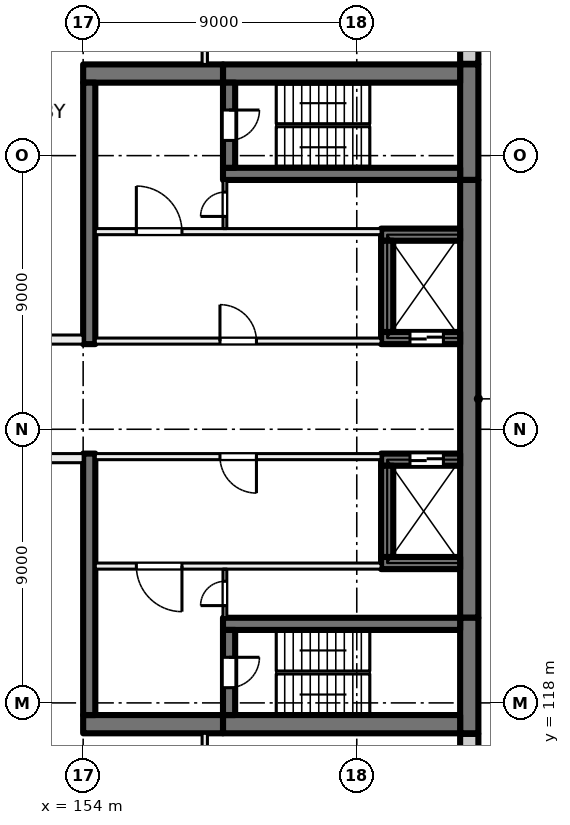
"""IFC4 building model, lengths in metres.
Left out: names, types, materials, properties, quantities, classifications, styles, units other than length and angle.
Written with IfcOpenShell. Run it as: python <this file> out.ifc"""

import sys

from ifc_helpers import new_model, si_unit, direction, frame, frame_2d, origin, place, context, subcontext, project, spatial, rectangle, extrude, element, fill, save


model = new_model("IFC4")
c1 = context("Model", 3, precision=1e-05, world=origin(), true_north=direction((0.0, 1.0)))
c2 = subcontext(c1, "Body", "Model", "MODEL_VIEW")
j1 = project(units=[si_unit("LENGTHUNIT", "METRE"), si_unit("PLANEANGLEUNIT", "RADIAN")], contexts=[c1])
p1 = place(None, origin())
s1 = spatial("IfcSite", under=j1, at=p1, CompositionType="ELEMENT")
p2 = place(p1, origin())
s2 = spatial("IfcBuilding", under=s1, at=p2, CompositionType="ELEMENT")
p3 = place(p2, frame((0.0, 0.0, 31.5)))
s3 = spatial("IfcBuildingStorey", under=s2, at=p3, CompositionType="ELEMENT", Elevation=31.5)
p4 = place(p3, frame((166.7, 139.0, 0.0), z_axis=(0.0, 0.0, 1.0), x_axis=(0.0, -1.0, 0.0)))
e1 = element("IfcWall", 1, at=p4, inside=s3, PredefinedType="SHEAR", context=c2, shape_type="SweptSolid", body=[
    extrude(rectangle(XDim=3.8, YDim=0.6, at=frame_2d((1.9, 0.0))), origin(), (0.0, 0.0, 1.0), 4.0),
])
p5 = place(p3, frame((166.7, 135.2, 0.0), z_axis=(0.0, 0.0, 1.0), x_axis=(0.0, -1.0, 0.0)))
e2 = element("IfcWall", 2, at=p5, inside=s3, PredefinedType="SHEAR", context=c2, shape_type="SweptSolid", body=[
    extrude(rectangle(XDim=14.4, YDim=0.6, at=frame_2d((7.2, 0.0))), origin(), (0.0, 0.0, 1.0), 4.0),
])
p6 = place(p3, frame((166.7, 120.8, 0.0), z_axis=(0.0, 0.0, 1.0), x_axis=(0.0, -1.0, 0.0)))
e3 = element("IfcWall", 3, at=p6, inside=s3, PredefinedType="SHEAR", context=c2, shape_type="SweptSolid", body=[
    extrude(rectangle(XDim=3.8, YDim=0.6, at=frame_2d((1.9, 0.0))), origin(), (0.0, 0.0, 1.0), 4.0),
])
for number, where, z_axis, x_axis in (
    (4, (166.4, 138.7, 0.0), (0.0, 0.0, 1.0), (-1.0, 0.0, 0.0)),
    (5, (166.4, 117.3, 0.0), (0.0, 0.0, 1.0), (-1.0, 0.0, 0.0)),
):
    element("IfcWall", number, at=place(p3, frame(where, z_axis=z_axis, x_axis=x_axis)), inside=s3, PredefinedType="SHEAR", context=c2, shape_type="SweptSolid", body=[
        extrude(rectangle(XDim=7.8, YDim=0.6, at=frame_2d((3.9, 0.0))), origin(), (0.0, 0.0, 1.0), 4.0),
    ])
for number, where, z_axis, x_axis in (
    (6, (158.6, 138.7, 0.0), (0.0, 0.0, 1.0), (-1.0, 0.0, 0.0)),
    (7, (158.6, 117.3, 0.0), (0.0, 0.0, 1.0), (-1.0, 0.0, 0.0)),
):
    element("IfcWall", number, at=place(p3, frame(where, z_axis=z_axis, x_axis=x_axis)), inside=s3, PredefinedType="SHEAR", context=c2, shape_type="SweptSolid", body=[
        extrude(rectangle(XDim=4.6, YDim=0.6, at=frame_2d((2.3, 0.0))), origin(), (0.0, 0.0, 1.0), 4.0),
    ])
p7 = place(p3, frame((166.4, 135.4, 0.0), z_axis=(0.0, 0.0, 1.0), x_axis=(-1.0, 0.0, 0.0)))
e8 = element("IfcWall", 8, at=p7, inside=s3, PredefinedType="SHEAR", context=c2, shape_type="SweptSolid", body=[
    extrude(rectangle(XDim=7.8, YDim=0.4, at=frame_2d((3.9, 0.0))), origin(), (0.0, 0.0, 1.0), 4.0),
])
p8 = place(p3, frame((158.8, 138.4, 0.0), z_axis=(0.0, 0.0, 1.0), x_axis=(0.0, -1.0, 0.0)))
e9 = element("IfcWall", 9, at=p8, inside=s3, PredefinedType="SHEAR", context=c2, shape_type="SweptSolid", body=[
    extrude(rectangle(XDim=2.8, YDim=0.4, at=frame_2d((1.4, 0.0))), origin(), (0.0, 0.0, 1.0), 4.0),
])
p9 = place(p8, frame((0.9, 0.0, 0.0)))
e10 = element("IfcOpeningElement", 10, at=p9, cuts=e9, PredefinedType="OPENING", context=c2, shape_type="SweptSolid", body=[
    extrude(rectangle(XDim=1.0, YDim=2.1, at=frame_2d((0.5, 1.05))), frame((0.0, 0.21, 0.0), z_axis=(0.0, -1.0, 0.0), x_axis=(1.0, 0.0, 0.0)), (0.0, 0.0, 1.0), 0.42),
])
p10 = place(p3, frame((166.4, 120.6, 0.0), z_axis=(0.0, 0.0, 1.0), x_axis=(-1.0, 0.0, 0.0)))
e11 = element("IfcWall", 11, at=p10, inside=s3, PredefinedType="SHEAR", context=c2, shape_type="SweptSolid", body=[
    extrude(rectangle(XDim=7.8, YDim=0.4, at=frame_2d((3.9, 0.0))), origin(), (0.0, 0.0, 1.0), 4.0),
])
p11 = place(p3, frame((158.8, 120.4, 0.0), z_axis=(0.0, 0.0, 1.0), x_axis=(0.0, -1.0, 0.0)))
e12 = element("IfcWall", 12, at=p11, inside=s3, PredefinedType="SHEAR", context=c2, shape_type="SweptSolid", body=[
    extrude(rectangle(XDim=2.8, YDim=0.4, at=frame_2d((1.4, 0.0))), origin(), (0.0, 0.0, 1.0), 4.0),
])
p12 = place(p11, frame((0.9, 0.0, 0.0)))
e13 = element("IfcOpeningElement", 13, at=p12, cuts=e12, PredefinedType="OPENING", context=c2, shape_type="SweptSolid", body=[
    extrude(rectangle(XDim=1.0, YDim=2.1, at=frame_2d((0.5, 1.05))), frame((0.0, 0.21, 0.0), z_axis=(0.0, -1.0, 0.0), x_axis=(1.0, 0.0, 0.0)), (0.0, 0.0, 1.0), 0.42),
])
p13 = place(p3, frame((166.4, 130.0, 0.0), z_axis=(0.0, 0.0, 1.0), x_axis=(-1.0, 0.0, 0.0)))
e14 = element("IfcWall", 14, at=p13, inside=s3, PredefinedType="SHEAR", context=c2, shape_type="SweptSolid", body=[
    extrude(rectangle(XDim=2.6, YDim=0.4, at=frame_2d((1.3, 0.0))), origin(), (0.0, 0.0, 1.0), 4.0),
])
p14 = place(p13, frame((0.55, 0.0, 0.0)))
e15 = element("IfcOpeningElement", 15, at=p14, cuts=e14, PredefinedType="OPENING", context=c2, shape_type="SweptSolid", body=[
    extrude(rectangle(XDim=1.1, YDim=2.1, at=frame_2d((0.55, 1.05))), frame((0.0, 0.21, 0.0), z_axis=(0.0, -1.0, 0.0), x_axis=(1.0, 0.0, 0.0)), (0.0, 0.0, 1.0), 0.42),
])
p15 = place(p3, frame((166.4, 133.4, 0.0), z_axis=(0.0, 0.0, 1.0), x_axis=(-1.0, 0.0, 0.0)))
e16 = element("IfcWall", 16, at=p15, inside=s3, PredefinedType="SHEAR", context=c2, shape_type="SweptSolid", body=[
    extrude(rectangle(XDim=2.6, YDim=0.4, at=frame_2d((1.3, 0.0))), origin(), (0.0, 0.0, 1.0), 4.0),
])
p16 = place(p3, frame((164.0, 133.2, 0.0), z_axis=(0.0, 0.0, 1.0), x_axis=(0.0, -1.0, 0.0)))
e17 = element("IfcWall", 17, at=p16, inside=s3, PredefinedType="SHEAR", context=c2, shape_type="SweptSolid", body=[
    extrude(rectangle(XDim=3.0, YDim=0.4, at=frame_2d((1.5, 0.0))), origin(), (0.0, 0.0, 1.0), 4.0),
])
p17 = place(p3, frame((166.4, 126.0, 0.0), z_axis=(0.0, 0.0, 1.0), x_axis=(-1.0, 0.0, 0.0)))
e18 = element("IfcWall", 18, at=p17, inside=s3, PredefinedType="SHEAR", context=c2, shape_type="SweptSolid", body=[
    extrude(rectangle(XDim=2.6, YDim=0.4, at=frame_2d((1.3, 0.0))), origin(), (0.0, 0.0, 1.0), 4.0),
])
p18 = place(p17, frame((0.55, 0.0, 0.0)))
e19 = element("IfcOpeningElement", 19, at=p18, cuts=e18, PredefinedType="OPENING", context=c2, shape_type="SweptSolid", body=[
    extrude(rectangle(XDim=1.1, YDim=2.1, at=frame_2d((0.55, 1.05))), frame((0.0, 0.21, 0.0), z_axis=(0.0, -1.0, 0.0), x_axis=(1.0, 0.0, 0.0)), (0.0, 0.0, 1.0), 0.42),
])
p19 = place(p3, frame((166.4, 122.6, 0.0), z_axis=(0.0, 0.0, 1.0), x_axis=(-1.0, 0.0, 0.0)))
e20 = element("IfcWall", 20, at=p19, inside=s3, PredefinedType="SHEAR", context=c2, shape_type="SweptSolid", body=[
    extrude(rectangle(XDim=2.6, YDim=0.4, at=frame_2d((1.3, 0.0))), origin(), (0.0, 0.0, 1.0), 4.0),
])
p20 = place(p3, frame((164.0, 125.8, 0.0), z_axis=(0.0, 0.0, 1.0), x_axis=(0.0, -1.0, 0.0)))
e21 = element("IfcWall", 21, at=p20, inside=s3, PredefinedType="SHEAR", context=c2, shape_type="SweptSolid", body=[
    extrude(rectangle(XDim=3.0, YDim=0.4, at=frame_2d((1.5, 0.0))), origin(), (0.0, 0.0, 1.0), 4.0),
])
for number, where, z_axis, x_axis in (
    (22, (154.2, 138.4, 0.0), (0.0, 0.0, 1.0), (0.0, -1.0, 0.0)),
    (23, (154.2, 126.2, 0.0), (0.0, 0.0, 1.0), (0.0, -1.0, 0.0)),
):
    element("IfcWall", number, at=place(p3, frame(where, z_axis=z_axis, x_axis=x_axis)), inside=s3, PredefinedType="SHEAR", context=c2, shape_type="SweptSolid", body=[
        extrude(rectangle(XDim=8.6, YDim=0.4, at=frame_2d((4.3, 0.0))), origin(), (0.0, 0.0, 1.0), 4.0),
    ])
p21 = place(p3, frame((166.7, 116.98, 0.0), z_axis=(0.0, 0.0, 1.0), x_axis=(0.0, -1.0, 0.0)))
e24 = element("IfcWall", 24, at=p21, inside=s3, PredefinedType="SOLIDWALL", context=c2, shape_type="SweptSolid", body=[
    extrude(rectangle(XDim=2.98, YDim=0.6, at=frame_2d((1.49, 0.0))), origin(), (0.0, 0.0, 1.0), 3.625),
])
p22 = place(p3, frame((166.7, 141.93, 0.0), z_axis=(0.0, 0.0, 1.0), x_axis=(0.0, -1.0, 0.0)))
e25 = element("IfcWall", 25, at=p22, inside=s3, PredefinedType="SOLIDWALL", context=c2, shape_type="SweptSolid", body=[
    extrude(rectangle(XDim=2.91, YDim=0.6, at=frame_2d((1.455, 0.0))), origin(), (0.0, 0.0, 1.0), 3.625),
])
p23 = place(p3, frame((163.8, 126.1, 0.0), z_axis=(0.0, 0.0, 1.0), x_axis=(-1.0, 0.0, 0.0)))
e26 = element("IfcWall", 26, at=p23, inside=s3, PredefinedType="PARTITIONING", context=c2, shape_type="SweptSolid", body=[
    extrude(rectangle(XDim=9.4, YDim=0.2, at=frame_2d((4.7, 0.0))), origin(), (0.0, 0.0, 1.0), 3.625),
])
p24 = place(p23, frame((4.1, 0.0, 0.0)))
e27 = element("IfcOpeningElement", 27, at=p24, cuts=e26, PredefinedType="OPENING", context=c2, shape_type="SweptSolid", body=[
    extrude(rectangle(XDim=1.2, YDim=2.1, at=frame_2d((0.6, 1.05))), frame((0.0, 0.11, 0.0), z_axis=(0.0, -1.0, 0.0), x_axis=(1.0, 0.0, 0.0)), (0.0, 0.0, 1.0), 0.22),
])
p25 = place(p3, frame((163.8, 122.5, 0.0), z_axis=(0.0, 0.0, 1.0), x_axis=(-1.0, 0.0, 0.0)))
e28 = element("IfcWall", 28, at=p25, inside=s3, PredefinedType="PARTITIONING", context=c2, shape_type="SweptSolid", body=[
    extrude(rectangle(XDim=9.4, YDim=0.2, at=frame_2d((4.7, 0.0))), origin(), (0.0, 0.0, 1.0), 3.625),
])
p26 = place(p25, frame((6.55, 0.0, 0.0)))
e29 = element("IfcOpeningElement", 29, at=p26, cuts=e28, PredefinedType="OPENING", context=c2, shape_type="SweptSolid", body=[
    extrude(rectangle(XDim=1.5, YDim=2.1, at=frame_2d((0.75, 1.05))), frame((0.0, 0.11, 0.0), z_axis=(0.0, -1.0, 0.0), x_axis=(1.0, 0.0, 0.0)), (0.0, 0.0, 1.0), 0.22),
])
p27 = place(p3, frame((158.663, 120.8, 0.0), z_axis=(0.0, 0.0, 1.0), x_axis=(0.0, 1.0, 0.0)))
e30 = element("IfcWall", 30, at=p27, inside=s3, PredefinedType="PARTITIONING", context=c2, shape_type="SweptSolid", body=[
    extrude(rectangle(XDim=1.6, YDim=0.125, at=frame_2d((0.8, 0.0))), origin(), (0.0, 0.0, 1.0), 3.625),
])
p28 = place(p27, frame((0.4, 0.0, 0.0)))
e31 = element("IfcOpeningElement", 31, at=p28, cuts=e30, PredefinedType="OPENING", context=c2, shape_type="SweptSolid", body=[
    extrude(rectangle(XDim=0.8, YDim=2.1, at=frame_2d((0.4, 1.05))), frame((0.0, 0.073, 0.0), z_axis=(0.0, -1.0, 0.0), x_axis=(1.0, 0.0, 0.0)), (0.0, 0.0, 1.0), 0.145),
])
p29 = place(p3, frame((154.4, 129.9, 0.0), z_axis=(0.0, 0.0, 1.0), x_axis=(1.0, 0.0, 0.0)))
e32 = element("IfcWall", 32, at=p29, inside=s3, PredefinedType="PARTITIONING", context=c2, shape_type="SweptSolid", body=[
    extrude(rectangle(XDim=9.4, YDim=0.2, at=frame_2d((4.7, 0.0))), origin(), (0.0, 0.0, 1.0), 3.625),
])
p30 = place(p29, frame((4.1, 0.0, 0.0)))
e33 = element("IfcOpeningElement", 33, at=p30, cuts=e32, PredefinedType="OPENING", context=c2, shape_type="SweptSolid", body=[
    extrude(rectangle(XDim=1.2, YDim=2.1, at=frame_2d((0.6, 1.05))), frame((0.0, 0.11, 0.0), z_axis=(0.0, -1.0, 0.0), x_axis=(1.0, 0.0, 0.0)), (0.0, 0.0, 1.0), 0.22),
])
p31 = place(p3, frame((154.4, 133.5, 0.0), z_axis=(0.0, 0.0, 1.0), x_axis=(1.0, 0.0, 0.0)))
e34 = element("IfcWall", 34, at=p31, inside=s3, PredefinedType="PARTITIONING", context=c2, shape_type="SweptSolid", body=[
    extrude(rectangle(XDim=9.4, YDim=0.2, at=frame_2d((4.7, 0.0))), origin(), (0.0, 0.0, 1.0), 3.625),
])
p32 = place(p31, frame((1.35, 0.0, 0.0)))
e35 = element("IfcOpeningElement", 35, at=p32, cuts=e34, PredefinedType="OPENING", context=c2, shape_type="SweptSolid", body=[
    extrude(rectangle(XDim=1.5, YDim=2.1, at=frame_2d((0.75, 1.05))), frame((0.0, 0.11, 0.0), z_axis=(0.0, -1.0, 0.0), x_axis=(1.0, 0.0, 0.0)), (0.0, 0.0, 1.0), 0.22),
])
p33 = place(p3, frame((158.663, 133.6, 0.0), z_axis=(0.0, 0.0, 1.0), x_axis=(0.0, 1.0, 0.0)))
e36 = element("IfcWall", 36, at=p33, inside=s3, PredefinedType="PARTITIONING", context=c2, shape_type="SweptSolid", body=[
    extrude(rectangle(XDim=1.6, YDim=0.125, at=frame_2d((0.8, 0.0))), origin(), (0.0, 0.0, 1.0), 3.625),
])
p34 = place(p33, frame((0.4, 0.0, 0.0)))
e37 = element("IfcOpeningElement", 37, at=p34, cuts=e36, PredefinedType="OPENING", context=c2, shape_type="SweptSolid", body=[
    extrude(rectangle(XDim=0.8, YDim=2.1, at=frame_2d((0.4, 1.05))), frame((0.0, 0.073, 0.0), z_axis=(0.0, -1.0, 0.0), x_axis=(1.0, 0.0, 0.0)), (0.0, 0.0, 1.0), 0.145),
])
p35 = place(p3, frame((140.0, 129.95, 0.0), z_axis=(0.0, 0.0, 1.0), x_axis=(1.0, 0.0, 0.0)))
e38 = element("IfcWall", 38, at=p35, inside=s3, PredefinedType="PARTITIONING", context=c2, shape_type="SweptSolid", body=[
    extrude(rectangle(XDim=14.0, YDim=0.3, at=frame_2d((7.0, 0.0))), origin(), (0.0, 0.0, 1.0), 3.625),
])
p36 = place(p35, frame((5.25, 0.0, 0.0)))
e39 = element("IfcOpeningElement", 39, at=p36, cuts=e38, PredefinedType="OPENING", context=c2, shape_type="SweptSolid", body=[
    extrude(rectangle(XDim=1.0, YDim=2.1, at=frame_2d((0.5, 1.05))), frame((0.0, 0.16, 0.0), z_axis=(0.0, -1.0, 0.0), x_axis=(1.0, 0.0, 0.0)), (0.0, 0.0, 1.0), 0.32),
])
p37 = place(p35, frame((10.6, 0.0, 0.0)))
e40 = element("IfcOpeningElement", 40, at=p37, cuts=e38, PredefinedType="OPENING", context=c2, shape_type="SweptSolid", body=[
    extrude(rectangle(XDim=1.8, YDim=2.1, at=frame_2d((0.9, 1.05))), frame((0.0, 0.16, 0.0), z_axis=(0.0, -1.0, 0.0), x_axis=(1.0, 0.0, 0.0)), (0.0, 0.0, 1.0), 0.32),
])
p38 = place(p3, frame((154.0, 126.05, 0.0), z_axis=(0.0, 0.0, 1.0), x_axis=(-1.0, 0.0, 0.0)))
e41 = element("IfcWall", 41, at=p38, inside=s3, PredefinedType="PARTITIONING", context=c2, shape_type="SweptSolid", body=[
    extrude(rectangle(XDim=14.0, YDim=0.3, at=frame_2d((7.0, 0.0))), origin(), (0.0, 0.0, 1.0), 3.625),
])
p39 = place(p38, frame((6.1, 0.0, 0.0)))
e42 = element("IfcOpeningElement", 42, at=p39, cuts=e41, PredefinedType="OPENING", context=c2, shape_type="SweptSolid", body=[
    extrude(rectangle(XDim=1.8, YDim=2.1, at=frame_2d((0.9, 1.05))), frame((0.0, 0.16, 0.0), z_axis=(0.0, -1.0, 0.0), x_axis=(1.0, 0.0, 0.0)), (0.0, 0.0, 1.0), 0.32),
])
p40 = place(p3, frame((158.0, 110.6, 0.0), z_axis=(0.0, 0.0, 1.0), x_axis=(0.0, 1.0, 0.0)))
e43 = element("IfcWall", 43, at=p40, inside=s3, PredefinedType="PARTITIONING", context=c2, shape_type="SweptSolid", body=[
    extrude(rectangle(XDim=6.4, YDim=0.175, at=frame_2d((3.2, 0.0))), origin(), (0.0, 0.0, 1.0), 3.625),
])
p41 = place(p40, frame((2.6, 0.0, 0.0)))
e44 = element("IfcOpeningElement", 44, at=p41, cuts=e43, PredefinedType="OPENING", context=c2, shape_type="SweptSolid", body=[
    extrude(rectangle(XDim=1.2, YDim=2.1, at=frame_2d((0.6, 1.05))), frame((0.0, 0.097, 0.0), z_axis=(0.0, -1.0, 0.0), x_axis=(1.0, 0.0, 0.0)), (0.0, 0.0, 1.0), 0.195),
])
p42 = place(p3, frame((158.0, 139.0, 0.0), z_axis=(0.0, 0.0, 1.0), x_axis=(0.0, 1.0, 0.0)))
e45 = element("IfcWall", 45, at=p42, inside=s3, PredefinedType="PARTITIONING", context=c2, shape_type="SweptSolid", body=[
    extrude(rectangle(XDim=6.4, YDim=0.175, at=frame_2d((3.2, 0.0))), origin(), (0.0, 0.0, 1.0), 3.625),
])
p43 = place(p42, frame((2.6, 0.0, 0.0)))
e46 = element("IfcOpeningElement", 46, at=p43, cuts=e45, PredefinedType="OPENING", context=c2, shape_type="SweptSolid", body=[
    extrude(rectangle(XDim=1.2, YDim=2.1, at=frame_2d((0.6, 1.05))), frame((0.0, 0.097, 0.0), z_axis=(0.0, -1.0, 0.0), x_axis=(1.0, 0.0, 0.0)), (0.0, 0.0, 1.0), 0.195),
])
p44 = place(p18, origin())
e47 = element("IfcDoor", 47, at=p44, inside=s3, OperationType="DOUBLE_DOOR_SLIDING", PredefinedType="DOOR", context=c2, shape_type="SweptSolid", body=[
    extrude(rectangle(XDim=1.1, YDim=2.1, at=frame_2d((0.55, 1.05))), frame((0.0, 0.025, 0.0), z_axis=(0.0, -1.0, 0.0), x_axis=(1.0, 0.0, 0.0)), (0.0, 0.0, 1.0), 0.05),
])
fill(e19, e47)
p45 = place(p14, origin())
e48 = element("IfcDoor", 48, at=p45, inside=s3, OperationType="DOUBLE_DOOR_SLIDING", PredefinedType="DOOR", context=c2, shape_type="SweptSolid", body=[
    extrude(rectangle(XDim=1.1, YDim=2.1, at=frame_2d((0.55, 1.05))), frame((0.0, 0.025, 0.0), z_axis=(0.0, -1.0, 0.0), x_axis=(1.0, 0.0, 0.0)), (0.0, 0.0, 1.0), 0.05),
])
fill(e15, e48)
p46 = place(p24, origin())
e49 = element("IfcDoor", 49, at=p46, inside=s3, OperationType="DOUBLE_DOOR_SINGLE_SWING", PredefinedType="DOOR", context=c2, shape_type="SweptSolid", body=[
    extrude(rectangle(XDim=1.2, YDim=2.1, at=frame_2d((0.6, 1.05))), frame((0.0, 0.025, 0.0), z_axis=(0.0, -1.0, 0.0), x_axis=(1.0, 0.0, 0.0)), (0.0, 0.0, 1.0), 0.05),
])
fill(e27, e49)
p47 = place(p26, origin())
e50 = element("IfcDoor", 50, at=p47, inside=s3, OperationType="DOUBLE_DOOR_SINGLE_SWING", PredefinedType="DOOR", context=c2, shape_type="SweptSolid", body=[
    extrude(rectangle(XDim=1.5, YDim=2.1, at=frame_2d((0.75, 1.05))), frame((0.0, 0.025, 0.0), z_axis=(0.0, -1.0, 0.0), x_axis=(1.0, 0.0, 0.0)), (0.0, 0.0, 1.0), 0.05),
])
fill(e29, e50)
p48 = place(p12, origin())
e51 = element("IfcDoor", 51, at=p48, inside=s3, OperationType="SINGLE_SWING_LEFT", PredefinedType="DOOR", context=c2, shape_type="SweptSolid", body=[
    extrude(rectangle(XDim=1.0, YDim=2.1, at=frame_2d((0.5, 1.05))), frame((0.0, 0.025, 0.0), z_axis=(0.0, -1.0, 0.0), x_axis=(1.0, 0.0, 0.0)), (0.0, 0.0, 1.0), 0.05),
])
fill(e13, e51)
p49 = place(p28, origin())
e52 = element("IfcDoor", 52, at=p49, inside=s3, OperationType="SINGLE_SWING_RIGHT", PredefinedType="DOOR", context=c2, shape_type="SweptSolid", body=[
    extrude(rectangle(XDim=0.8, YDim=2.1, at=frame_2d((0.4, 1.05))), frame((0.0, 0.025, 0.0), z_axis=(0.0, -1.0, 0.0), x_axis=(1.0, 0.0, 0.0)), (0.0, 0.0, 1.0), 0.05),
])
fill(e31, e52)
p50 = place(p30, origin())
e53 = element("IfcDoor", 53, at=p50, inside=s3, OperationType="DOUBLE_DOOR_SINGLE_SWING", PredefinedType="DOOR", context=c2, shape_type="SweptSolid", body=[
    extrude(rectangle(XDim=1.2, YDim=2.1, at=frame_2d((0.6, 1.05))), frame((0.0, 0.025, 0.0), z_axis=(0.0, -1.0, 0.0), x_axis=(1.0, 0.0, 0.0)), (0.0, 0.0, 1.0), 0.05),
])
fill(e33, e53)
p51 = place(p32, origin())
e54 = element("IfcDoor", 54, at=p51, inside=s3, OperationType="DOUBLE_DOOR_SINGLE_SWING", PredefinedType="DOOR", context=c2, shape_type="SweptSolid", body=[
    extrude(rectangle(XDim=1.5, YDim=2.1, at=frame_2d((0.75, 1.05))), frame((0.0, 0.025, 0.0), z_axis=(0.0, -1.0, 0.0), x_axis=(1.0, 0.0, 0.0)), (0.0, 0.0, 1.0), 0.05),
])
fill(e35, e54)
p52 = place(p9, origin())
e55 = element("IfcDoor", 55, at=p52, inside=s3, OperationType="SINGLE_SWING_RIGHT", PredefinedType="DOOR", context=c2, shape_type="SweptSolid", body=[
    extrude(rectangle(XDim=1.0, YDim=2.1, at=frame_2d((0.5, 1.05))), frame((0.0, 0.025, 0.0), z_axis=(0.0, -1.0, 0.0), x_axis=(1.0, 0.0, 0.0)), (0.0, 0.0, 1.0), 0.05),
])
fill(e10, e55)
p53 = place(p34, origin())
e56 = element("IfcDoor", 56, at=p53, inside=s3, OperationType="SINGLE_SWING_LEFT", PredefinedType="DOOR", context=c2, shape_type="SweptSolid", body=[
    extrude(rectangle(XDim=0.8, YDim=2.1, at=frame_2d((0.4, 1.05))), frame((0.0, 0.025, 0.0), z_axis=(0.0, -1.0, 0.0), x_axis=(1.0, 0.0, 0.0)), (0.0, 0.0, 1.0), 0.05),
])
fill(e37, e56)
save(model, sys.argv[1])
